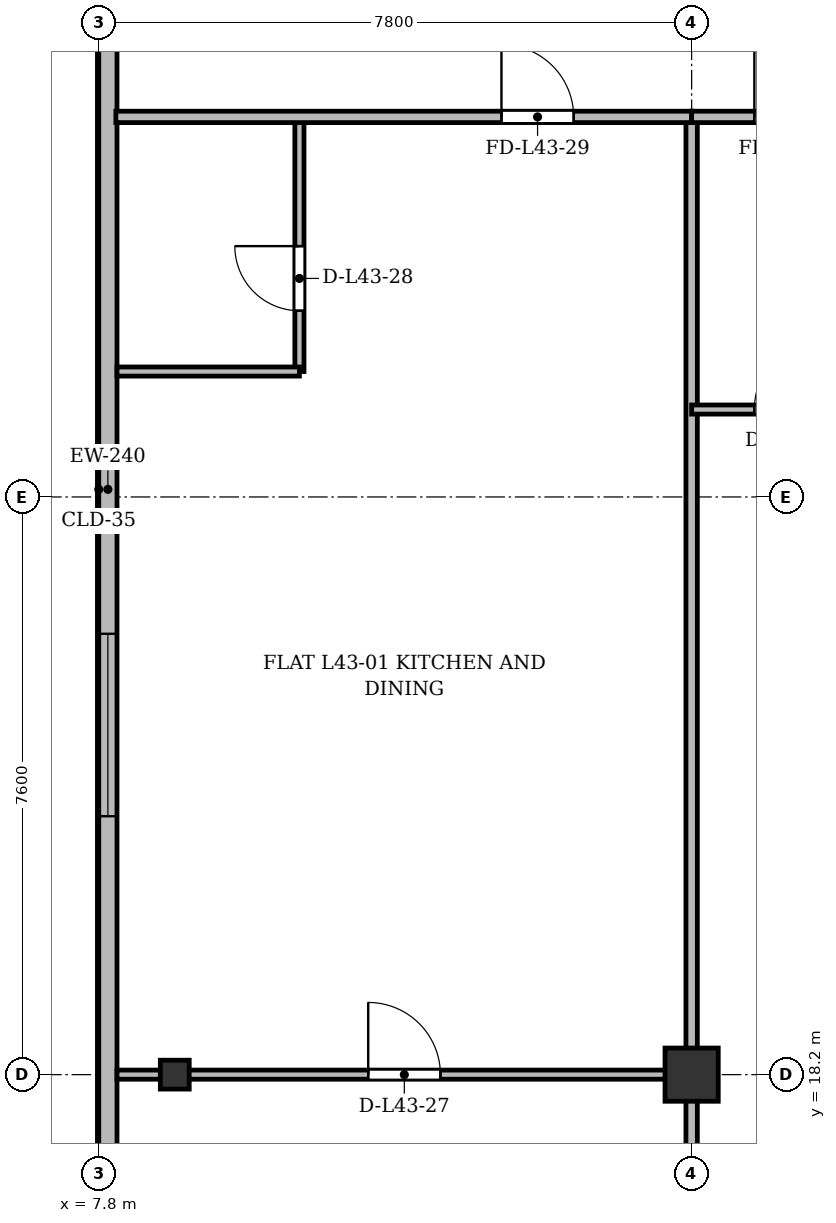
"""IFC4 building model, lengths in metres.
Left out: names, types, materials, properties, quantities, classifications, styles, units other than length and angle.
Written with IfcOpenShell. Run it as: python <this file> out.ifc"""

import sys

from ifc_helpers import new_model, si_unit, direction, frame, frame_2d, origin, origin_2d, place, context, subcontext, project, spatial, rectangle, i_section, extrude, source, transform, mapped, element, fill, save


model = new_model("IFC4")
c1 = context("Model", 3, precision=1e-05, world=origin(), true_north=direction((0.0, 1.0)))
c2 = subcontext(c1, "Body", "Model", "MODEL_VIEW")
j1 = project(units=[si_unit("LENGTHUNIT", "METRE"), si_unit("PLANEANGLEUNIT", "RADIAN")], contexts=[c1])
p1 = place(None, origin())
s1 = spatial("IfcSite", under=j1, at=p1, CompositionType="ELEMENT")
p2 = place(p1, origin())
s2 = spatial("IfcBuilding", under=s1, at=p2, CompositionType="ELEMENT")
p3 = place(p2, frame((0.0, 0.0, 164.5)))
s3 = spatial("IfcBuildingStorey", under=s2, at=p3, CompositionType="ELEMENT", Elevation=164.5)
m1 = source(origin(), c2, "Body", "SweptSolid", [
    extrude(i_section(OverallWidth=0.38, OverallDepth=0.38, WebThickness=0.02, FlangeThickness=0.03, at=origin_2d()), origin(), (0.0, 0.0, 1.0), 3.6),
])
p4 = place(p3, frame((8.8, 18.2, 0.0), z_axis=(0.0, 0.0, 1.0), x_axis=(1.0, 0.0, 0.0)))
e1 = element("IfcColumn", 1, at=p4, inside=s3, PredefinedType="COLUMN", context=c2, shape_type="MappedRepresentation", body=[
    mapped(m1, transform((0.0, 0.0, 0.0), x_axis=(1.0, 0.0, 0.0), y_axis=(0.0, 1.0, 0.0), z_axis=(0.0, 0.0, 1.0), scale=1.0)),
])
m2 = source(origin(), c2, "Body", "SweptSolid", [
    extrude(rectangle(XDim=0.7, YDim=0.7, at=origin_2d()), origin(), (0.0, 0.0, 1.0), 3.6),
])
p5 = place(p3, frame((15.6, 18.2, 0.0), z_axis=(0.0, 0.0, 1.0), x_axis=(1.0, 0.0, 0.0)))
e2 = element("IfcColumn", 2, at=p5, inside=s3, PredefinedType="COLUMN", context=c2, shape_type="MappedRepresentation", body=[
    mapped(m2, transform((0.0, 0.0, 0.0), x_axis=(1.0, 0.0, 0.0), y_axis=(0.0, 1.0, 0.0), z_axis=(0.0, 0.0, 1.0), scale=1.0)),
])
p6 = place(p3, frame((7.92, 6.3, 0.0), z_axis=(0.0, 0.0, 1.0), x_axis=(0.0, 1.0, 0.0)))
e3 = element("IfcWall", 3, at=p6, inside=s3, PredefinedType="SOLIDWALL", context=c2, shape_type="SweptSolid", body=[
    extrude(rectangle(XDim=39.2, YDim=0.24, at=frame_2d((19.6, 0.0))), origin(), (0.0, 0.0, 1.0), 3.35),
])
p7 = place(p6, frame((1.45, 0.0, 0.92)))
e4 = element("IfcOpeningElement", 4, at=p7, cuts=e3, PredefinedType="OPENING", context=c2, shape_type="SweptSolid", body=[
    extrude(rectangle(XDim=1.2, YDim=1.65, at=frame_2d((0.6, 0.825))), frame((0.0, 0.13, 0.0), z_axis=(0.0, -1.0, 0.0), x_axis=(1.0, 0.0, 0.0)), (0.0, 0.0, 1.0), 0.26),
])
p8 = place(p6, frame((3.9, 0.0, 0.92)))
e5 = element("IfcOpeningElement", 5, at=p8, cuts=e3, PredefinedType="OPENING", context=c2, shape_type="SweptSolid", body=[
    extrude(rectangle(XDim=2.4, YDim=2.1, at=frame_2d((1.2, 1.05))), frame((0.0, 0.13, 0.0), z_axis=(0.0, -1.0, 0.0), x_axis=(1.0, 0.0, 0.0)), (0.0, 0.0, 1.0), 0.26),
])
p9 = place(p6, frame((8.1, 0.0, 0.92)))
e6 = element("IfcOpeningElement", 6, at=p9, cuts=e3, PredefinedType="OPENING", context=c2, shape_type="SweptSolid", body=[
    extrude(rectangle(XDim=2.4, YDim=2.1, at=frame_2d((1.2, 1.05))), frame((0.0, 0.13, 0.0), z_axis=(0.0, -1.0, 0.0), x_axis=(1.0, 0.0, 0.0)), (0.0, 0.0, 1.0), 0.26),
])
p10 = place(p6, frame((15.3, 0.0, 0.92)))
e7 = element("IfcOpeningElement", 7, at=p10, cuts=e3, PredefinedType="OPENING", context=c2, shape_type="SweptSolid", body=[
    extrude(rectangle(XDim=2.4, YDim=2.1, at=frame_2d((1.2, 1.05))), frame((0.0, 0.13, 0.0), z_axis=(0.0, -1.0, 0.0), x_axis=(1.0, 0.0, 0.0)), (0.0, 0.0, 1.0), 0.26),
])
p11 = place(p6, frame((29.3, 0.0, 0.92)))
e8 = element("IfcOpeningElement", 8, at=p11, cuts=e3, PredefinedType="OPENING", context=c2, shape_type="SweptSolid", body=[
    extrude(rectangle(XDim=2.4, YDim=2.1, at=frame_2d((1.2, 1.05))), frame((0.0, 0.13, 0.0), z_axis=(0.0, -1.0, 0.0), x_axis=(1.0, 0.0, 0.0)), (0.0, 0.0, 1.0), 0.26),
])
p12 = place(p6, frame((36.85, 0.0, 0.92)))
e9 = element("IfcOpeningElement", 9, at=p12, cuts=e3, PredefinedType="OPENING", context=c2, shape_type="SweptSolid", body=[
    extrude(rectangle(XDim=1.2, YDim=1.65, at=frame_2d((0.6, 0.825))), frame((0.0, 0.13, 0.0), z_axis=(0.0, -1.0, 0.0), x_axis=(1.0, 0.0, 0.0)), (0.0, 0.0, 1.0), 0.26),
])
p13 = place(p3, frame((15.6, 3.525, 0.0), z_axis=(0.0, 0.0, 1.0), x_axis=(0.0, 1.0, 0.0)))
e10 = element("IfcWall", 10, at=p13, inside=s3, PredefinedType="PARTITIONING", context=c2, shape_type="SweptSolid", body=[
    extrude(rectangle(XDim=27.275, YDim=0.15, at=frame_2d((13.638, 0.0))), origin(), (0.0, 0.0, 1.0), 2.85),
])
p14 = place(p3, frame((8.04, 18.2, 0.0), z_axis=(0.0, 0.0, 1.0), x_axis=(1.0, 0.0, 0.0)))
e11 = element("IfcWall", 11, at=p14, inside=s3, PredefinedType="PARTITIONING", context=c2, shape_type="SweptSolid", body=[
    extrude(rectangle(XDim=7.56, YDim=0.12, at=frame_2d((3.78, 0.0))), origin(), (0.0, 0.0, 1.0), 2.75),
])
p15 = place(p14, frame((3.305, 0.0, 0.0)))
e12 = element("IfcOpeningElement", 12, at=p15, cuts=e11, PredefinedType="OPENING", context=c2, shape_type="SweptSolid", body=[
    extrude(rectangle(XDim=0.95, YDim=2.15, at=frame_2d((0.475, 1.075))), frame((0.0, 0.07, 0.0), z_axis=(0.0, -1.0, 0.0), x_axis=(1.0, 0.0, 0.0)), (0.0, 0.0, 1.0), 0.14),
])
p16 = place(p3, frame((10.44, 27.45, 0.0), z_axis=(0.0, 0.0, 1.0), x_axis=(0.0, 1.0, 0.0)))
e13 = element("IfcWall", 13, at=p16, inside=s3, PredefinedType="PARTITIONING", context=c2, shape_type="SweptSolid", body=[
    extrude(rectangle(XDim=3.35, YDim=0.12, at=frame_2d((1.675, 0.0))), origin(), (0.0, 0.0, 1.0), 3.35),
])
p17 = place(p16, frame((0.8, 0.0, 0.0)))
e14 = element("IfcOpeningElement", 14, at=p17, cuts=e13, PredefinedType="OPENING", context=c2, shape_type="SweptSolid", body=[
    extrude(rectangle(XDim=0.85, YDim=2.1, at=frame_2d((0.425, 1.05))), frame((0.0, 0.07, 0.0), z_axis=(0.0, -1.0, 0.0), x_axis=(1.0, 0.0, 0.0)), (0.0, 0.0, 1.0), 0.14),
])
p18 = place(p3, frame((8.04, 27.45, 0.0), z_axis=(0.0, 0.0, 1.0), x_axis=(1.0, 0.0, 0.0)))
e15 = element("IfcWall", 15, at=p18, inside=s3, PredefinedType="PARTITIONING", context=c2, shape_type="SweptSolid", body=[
    extrude(rectangle(XDim=2.4, YDim=0.12, at=frame_2d((1.2, 0.0))), origin(), (0.0, 0.0, 1.0), 2.85),
])
p19 = place(p3, frame((8.025, 30.8, 0.0), z_axis=(0.0, 0.0, 1.0), x_axis=(1.0, 0.0, 0.0)))
e16 = element("IfcWall", 16, at=p19, inside=s3, PredefinedType="PARTITIONING", context=c2, shape_type="SweptSolid", body=[
    extrude(rectangle(XDim=7.575, YDim=0.15, at=frame_2d((3.788, 0.0))), origin(), (0.0, 0.0, 1.0), 2.85),
])
p20 = place(p19, frame((5.073, 0.0, 0.0)))
e17 = element("IfcOpeningElement", 17, at=p20, cuts=e16, PredefinedType="OPENING", context=c2, shape_type="SweptSolid", body=[
    extrude(rectangle(XDim=0.95, YDim=2.15, at=frame_2d((0.475, 1.075))), frame((0.0, 0.085, 0.0), z_axis=(0.0, -1.0, 0.0), x_axis=(1.0, 0.0, 0.0)), (0.0, 0.0, 1.0), 0.17),
])
p21 = place(p3, frame((15.6, 30.8, 0.0), z_axis=(0.0, 0.0, 1.0), x_axis=(1.0, 0.0, 0.0)))
e18 = element("IfcWall", 18, at=p21, inside=s3, PredefinedType="PARTITIONING", context=c2, shape_type="SweptSolid", body=[
    extrude(rectangle(XDim=2.6, YDim=0.15, at=frame_2d((1.3, 0.0))), origin(), (0.0, 0.0, 1.0), 2.85),
])
p22 = place(p21, frame((0.825, 0.0, 0.0)))
e19 = element("IfcOpeningElement", 19, at=p22, cuts=e18, PredefinedType="OPENING", context=c2, shape_type="SweptSolid", body=[
    extrude(rectangle(XDim=0.95, YDim=2.15, at=frame_2d((0.475, 1.075))), frame((0.0, 0.085, 0.0), z_axis=(0.0, -1.0, 0.0), x_axis=(1.0, 0.0, 0.0)), (0.0, 0.0, 1.0), 0.17),
])
p23 = place(p3, frame((15.6, 26.95, 0.0), z_axis=(0.0, 0.0, 1.0), x_axis=(1.0, 0.0, 0.0)))
e20 = element("IfcWall", 20, at=p23, inside=s3, PredefinedType="PARTITIONING", context=c2, shape_type="SweptSolid", body=[
    extrude(rectangle(XDim=2.6, YDim=0.12, at=frame_2d((1.3, 0.0))), origin(), (0.0, 0.0, 1.0), 2.85),
])
p24 = place(p23, frame((0.825, 0.0, 0.0)))
e21 = element("IfcOpeningElement", 21, at=p24, cuts=e20, PredefinedType="OPENING", context=c2, shape_type="SweptSolid", body=[
    extrude(rectangle(XDim=0.95, YDim=2.15, at=frame_2d((0.475, 1.075))), frame((0.0, 0.07, 0.0), z_axis=(0.0, -1.0, 0.0), x_axis=(1.0, 0.0, 0.0)), (0.0, 0.0, 1.0), 0.14),
])
m3 = source(origin(), c2, "Body", "SweptSolid", [
    extrude(rectangle(XDim=2.4, YDim=2.1, at=frame_2d((1.2, 1.05))), frame((0.0, 0.03, 0.0), z_axis=(0.0, -1.0, 0.0), x_axis=(1.0, 0.0, 0.0)), (0.0, 0.0, 1.0), 0.06),
])
p25 = place(p10, origin())
e22 = element("IfcWindow", 22, at=p25, inside=s3, PartitioningType="SINGLE_PANEL", PredefinedType="WINDOW", context=c2, shape_type="MappedRepresentation", body=[
    mapped(m3, transform((0.0, 0.0, 0.0), x_axis=(1.0, 0.0, 0.0), y_axis=(0.0, 1.0, 0.0), z_axis=(0.0, 0.0, 1.0), scale=1.0)),
])
fill(e7, e22)
m4 = source(origin(), c2, "Body", "SweptSolid", [
    extrude(rectangle(XDim=0.95, YDim=2.15, at=frame_2d((0.475, 1.075))), frame((0.0, 0.025, 0.0), z_axis=(0.0, -1.0, 0.0), x_axis=(1.0, 0.0, 0.0)), (0.0, 0.0, 1.0), 0.05),
])
p26 = place(p15, origin())
e23 = element("IfcDoor", 23, at=p26, inside=s3, OperationType="SINGLE_SWING_LEFT", PredefinedType="DOOR", context=c2, shape_type="MappedRepresentation", body=[
    mapped(m4, transform((0.0, 0.0, 0.0), x_axis=(1.0, 0.0, 0.0), y_axis=(0.0, 1.0, 0.0), z_axis=(0.0, 0.0, 1.0), scale=1.0)),
])
fill(e12, e23)
m5 = source(origin(), c2, "Body", "SweptSolid", [
    extrude(rectangle(XDim=0.85, YDim=2.1, at=frame_2d((0.425, 1.05))), frame((0.0, 0.025, 0.0), z_axis=(0.0, -1.0, 0.0), x_axis=(1.0, 0.0, 0.0)), (0.0, 0.0, 1.0), 0.05),
])
p27 = place(p17, origin())
e24 = element("IfcDoor", 24, at=p27, inside=s3, OperationType="SINGLE_SWING_RIGHT", PredefinedType="DOOR", context=c2, shape_type="MappedRepresentation", body=[
    mapped(m5, transform((0.0, 0.0, 0.0), x_axis=(1.0, 0.0, 0.0), y_axis=(0.0, 1.0, 0.0), z_axis=(0.0, 0.0, 1.0), scale=1.0)),
])
fill(e14, e24)
p28 = place(p20, origin())
e25 = element("IfcDoor", 25, at=p28, inside=s3, OperationType="SINGLE_SWING_LEFT", PredefinedType="DOOR", context=c2, shape_type="MappedRepresentation", body=[
    mapped(m4, transform((0.0, 0.0, 0.0), x_axis=(1.0, 0.0, 0.0), y_axis=(0.0, 1.0, 0.0), z_axis=(0.0, 0.0, 1.0), scale=1.0)),
])
fill(e17, e25)
p29 = place(p22, origin())
e26 = element("IfcDoor", 26, at=p29, inside=s3, OperationType="SINGLE_SWING_LEFT", PredefinedType="DOOR", context=c2, shape_type="MappedRepresentation", body=[
    mapped(m4, transform((0.0, 0.0, 0.0), x_axis=(1.0, 0.0, 0.0), y_axis=(0.0, 1.0, 0.0), z_axis=(0.0, 0.0, 1.0), scale=1.0)),
])
fill(e19, e26)
p30 = place(p24, origin())
e27 = element("IfcDoor", 27, at=p30, inside=s3, OperationType="SINGLE_SWING_RIGHT", PredefinedType="DOOR", context=c2, shape_type="MappedRepresentation", body=[
    mapped(m4, transform((0.0, 0.0, 0.0), x_axis=(1.0, 0.0, 0.0), y_axis=(0.0, 1.0, 0.0), z_axis=(0.0, 0.0, 1.0), scale=1.0)),
])
fill(e21, e27)
save(model, sys.argv[1])
